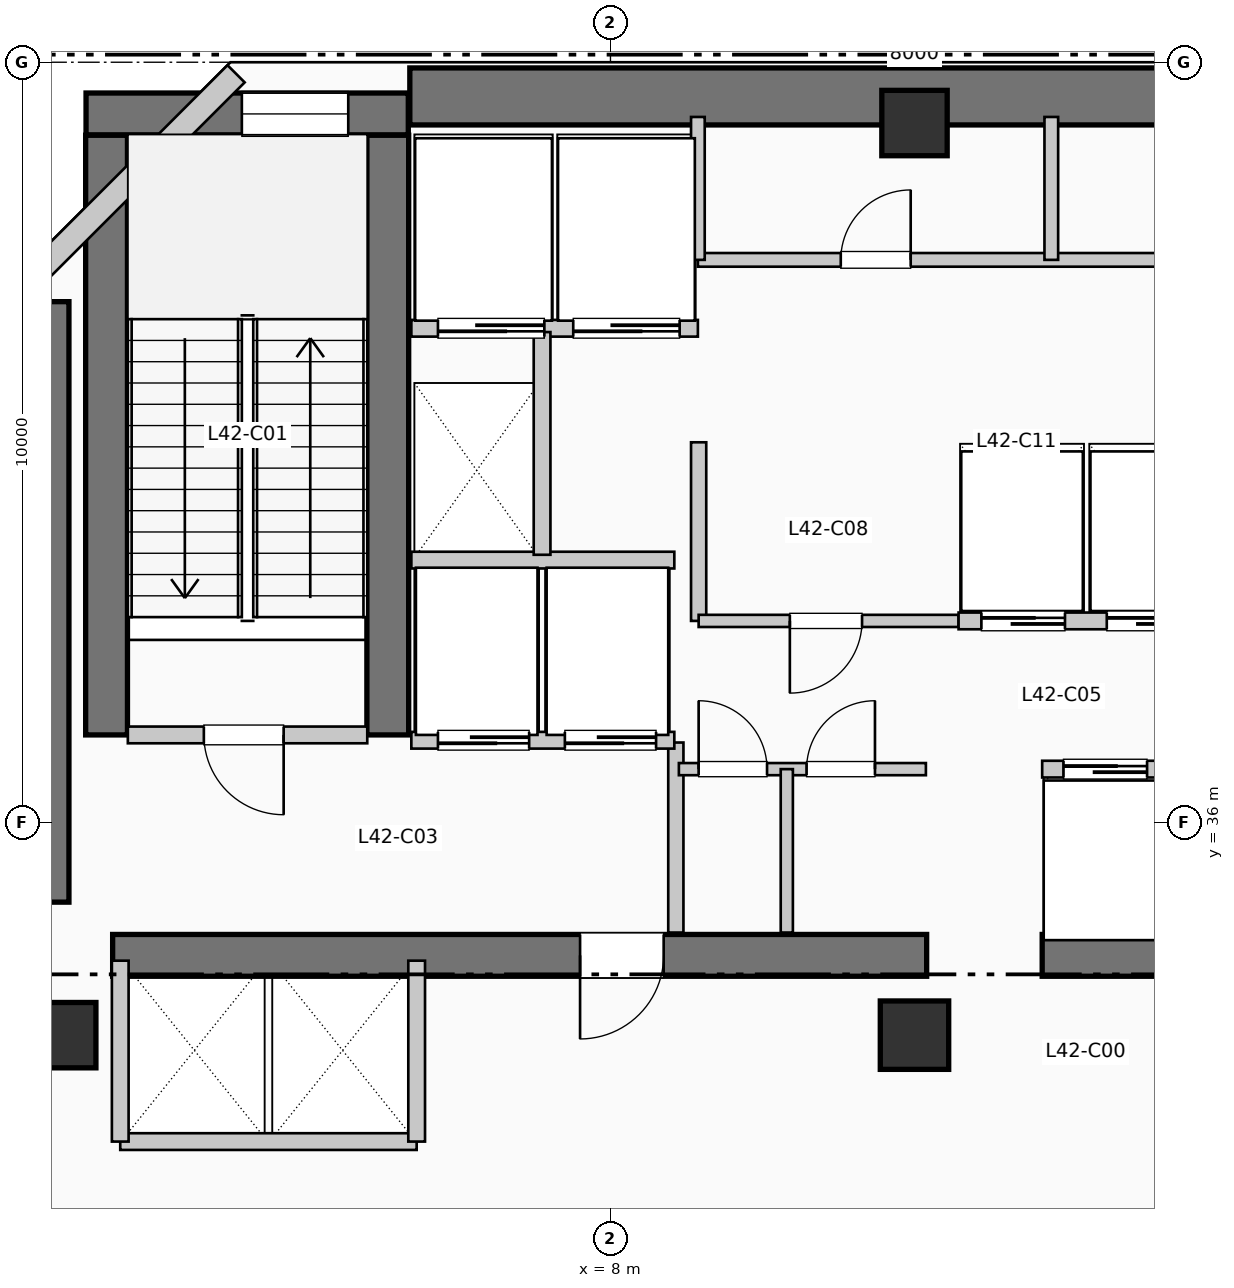
"""IFC4 building model, lengths in metres.
Left out: names, types, materials, properties, quantities, classifications, styles, units other than length and angle.
Written with IfcOpenShell. Run it as: python <this file> out.ifc"""

import sys

from ifc_helpers import new_model, si_unit, direction, frame, frame_2d, origin, origin_2d, place, context, subcontext, project, spatial, rectangle, extrude, element, fill, save


model = new_model("IFC4")
c1 = context("Model", 3, precision=1e-05, world=origin(), true_north=direction((0.0, 1.0)))
c2 = subcontext(c1, "Body", "Model", "MODEL_VIEW")
j1 = project(units=[si_unit("LENGTHUNIT", "METRE"), si_unit("PLANEANGLEUNIT", "RADIAN")], contexts=[c1])
p1 = place(None, origin())
s1 = spatial("IfcSite", under=j1, at=p1, CompositionType="ELEMENT")
p2 = place(p1, origin())
s2 = spatial("IfcBuilding", under=s1, at=p2, CompositionType="ELEMENT")
p3 = place(p2, frame((0.0, 0.0, 174.57)))
s3 = spatial("IfcBuildingStorey", under=s2, at=p3, CompositionType="ELEMENT", Elevation=174.57)
p4 = place(p3, frame((5.36, 45.55, 0.0), z_axis=(0.0, 0.0, 1.0), x_axis=(1.0, 0.0, 0.0)))
e1 = element("IfcWall", 1, at=p4, inside=s3, PredefinedType="SHEAR", context=c2, shape_type="SweptSolid", body=[
    extrude(rectangle(XDim=13.98, YDim=0.75, at=frame_2d((6.99, 0.0))), origin(), (0.0, 0.0, 1.0), 4.95),
])
p5 = place(p3, frame((0.5, 34.95, 0.0), z_axis=(0.0, 0.0, 1.0), x_axis=(0.0, 1.0, 0.0)))
e2 = element("IfcWall", 2, at=p5, inside=s3, PredefinedType="SHEAR", context=c2, shape_type="SweptSolid", body=[
    extrude(rectangle(XDim=7.9, YDim=0.75, at=frame_2d((3.95, 0.0))), origin(), (0.0, 0.0, 1.0), 4.95),
])
p6 = place(p3, frame((1.45, 34.25, 0.0), z_axis=(0.0, 0.0, 1.0), x_axis=(1.0, 0.0, 0.0)))
e3 = element("IfcWall", 3, at=p6, inside=s3, PredefinedType="SHEAR", context=c2, shape_type="SweptSolid", body=[
    extrude(rectangle(XDim=10.71, YDim=0.55, at=frame_2d((5.355, 0.0))), origin(), (0.0, 0.0, 1.0), 4.95),
])
p7 = place(p6, frame((7.25, 0.0, 0.0), z_axis=(0.0, 0.0, 1.0), x_axis=(-1.0, 0.0, 0.0)))
e4 = element("IfcOpeningElement", 4, at=p7, cuts=e3, PredefinedType="OPENING", context=c2, shape_type="SweptSolid", body=[
    extrude(rectangle(XDim=1.1, YDim=2.15, at=frame_2d((0.55, 1.075))), frame((0.0, 0.285, 0.0), z_axis=(0.0, -1.0, 0.0), x_axis=(1.0, 0.0, 0.0)), (0.0, 0.0, 1.0), 0.57),
])
p8 = place(p3, frame((13.68, 34.25, 0.0), z_axis=(0.0, 0.0, 1.0), x_axis=(1.0, 0.0, 0.0)))
e5 = element("IfcWall", 5, at=p8, inside=s3, PredefinedType="SHEAR", context=c2, shape_type="SweptSolid", body=[
    extrude(rectangle(XDim=6.12, YDim=0.55, at=frame_2d((3.06, 0.0))), origin(), (0.0, 0.0, 1.0), 4.95),
])
for number, where, z_axis, x_axis in (
    (6, (1.37, 37.15, 0.0), (0.0, 0.0, 1.0), (0.0, 1.0, 0.0)),
    (7, (5.07, 37.15, 0.0), (0.0, 0.0, 1.0), (0.0, 1.0, 0.0)),
):
    element("IfcWall", number, at=place(p3, frame(where, z_axis=z_axis, x_axis=x_axis)), inside=s3, PredefinedType="SHEAR", context=c2, shape_type="SweptSolid", body=[
        extrude(rectangle(XDim=7.89, YDim=0.55, at=frame_2d((3.945, 0.0))), origin(), (0.0, 0.0, 1.0), 4.95),
    ])
p9 = place(p3, frame((1.1, 45.32, 0.0), z_axis=(0.0, 0.0, 1.0), x_axis=(1.0, 0.0, 0.0)))
e8 = element("IfcWall", 8, at=p9, inside=s3, PredefinedType="SHEAR", context=c2, shape_type="SweptSolid", body=[
    extrude(rectangle(XDim=4.24, YDim=0.55, at=frame_2d((2.12, 0.0))), origin(), (0.0, 0.0, 1.0), 4.95),
])
p10 = place(p9, frame((2.05, 0.0, 1.05)))
e9 = element("IfcOpeningElement", 9, at=p10, cuts=e8, PredefinedType="OPENING", context=c2, shape_type="SweptSolid", body=[
    extrude(rectangle(XDim=1.4, YDim=1.8, at=frame_2d((0.7, 0.9))), frame((0.0, 0.285, 0.0), z_axis=(0.0, -1.0, 0.0), x_axis=(1.0, 0.0, 0.0)), (0.0, 0.0, 1.0), 0.57),
])
p11 = place(p3, frame((0.8, 33.2, 0.0), z_axis=(0.0, 0.0, 1.0), x_axis=(1.0, 0.0, 0.0)))
e10 = element("IfcColumn", 10, at=p11, inside=s3, PredefinedType="COLUMN", context=c2, shape_type="SweptSolid", body=[
    extrude(rectangle(XDim=0.86, YDim=0.86, at=origin_2d()), origin(), (0.0, 0.0, 1.0), 4.95),
])
p12 = place(p3, frame((12.0, 33.2, 0.0), z_axis=(0.0, 0.0, 1.0), x_axis=(1.0, 0.0, 0.0)))
e11 = element("IfcColumn", 11, at=p12, inside=s3, PredefinedType="COLUMN", context=c2, shape_type="SweptSolid", body=[
    extrude(rectangle(XDim=0.9, YDim=0.9, at=origin_2d()), origin(), (0.0, 0.0, 1.0), 4.95),
])
p13 = place(p3, frame((12.0, 45.2, 0.0), z_axis=(0.0, 0.0, 1.0), x_axis=(1.0, 0.0, 0.0)))
e12 = element("IfcColumn", 12, at=p13, inside=s3, PredefinedType="COLUMN", context=c2, shape_type="SweptSolid", body=[
    extrude(rectangle(XDim=0.86, YDim=0.86, at=origin_2d()), origin(), (0.0, 0.0, 1.0), 4.95),
])
p14 = place(p3, frame((3.074, 45.848, 0.0), z_axis=(0.0, 0.0, 1.0), x_axis=(-0.707106781187, -0.707106781187, 0.0)))
e13 = element("IfcWall", 13, at=p14, inside=s3, PredefinedType="SOLIDWALL", context=c2, shape_type="SweptSolid", body=[
    extrude(rectangle(XDim=4.133, YDim=0.32, at=frame_2d((2.066, 0.0))), origin(), (0.0, 0.0, 1.0), 4.7),
])
p15 = place(p3, frame((1.65, 37.15, 0.0), z_axis=(0.0, 0.0, 1.0), x_axis=(1.0, 0.0, 0.0)))
e14 = element("IfcWall", 14, at=p15, inside=s3, PredefinedType="PARTITIONING", context=c2, shape_type="SweptSolid", body=[
    extrude(rectangle(XDim=3.15, YDim=0.22, at=frame_2d((1.575, 0.0))), origin(), (0.0, 0.0, 1.0), 4.7),
])
p16 = place(p15, frame((2.05, 0.0, 0.0), z_axis=(0.0, 0.0, 1.0), x_axis=(-1.0, 0.0, 0.0)))
e15 = element("IfcOpeningElement", 15, at=p16, cuts=e14, PredefinedType="OPENING", context=c2, shape_type="SweptSolid", body=[
    extrude(rectangle(XDim=1.05, YDim=2.15, at=frame_2d((0.525, 1.075))), frame((0.0, 0.12, 0.0), z_axis=(0.0, -1.0, 0.0), x_axis=(1.0, 0.0, 0.0)), (0.0, 0.0, 1.0), 0.24),
])
p17 = place(p3, frame((8.86, 34.55, 0.0), z_axis=(0.0, 0.0, 1.0), x_axis=(0.0, 1.0, 0.0)))
e16 = element("IfcWall", 16, at=p17, inside=s3, PredefinedType="PARTITIONING", context=c2, shape_type="SweptSolid", body=[
    extrude(rectangle(XDim=2.5, YDim=0.2, at=frame_2d((1.25, 0.0))), origin(), (0.0, 0.0, 1.0), 4.7),
])
p18 = place(p3, frame((5.38, 37.08, 0.0), z_axis=(0.0, 0.0, 1.0), x_axis=(1.0, 0.0, 0.0)))
e17 = element("IfcWall", 17, at=p18, inside=s3, PredefinedType="PARTITIONING", context=c2, shape_type="SweptSolid", body=[
    extrude(rectangle(XDim=3.46, YDim=0.22, at=frame_2d((1.73, 0.0))), origin(), (0.0, 0.0, 1.0), 4.7),
])
p19 = place(p18, frame((1.55, 0.0, 0.0), z_axis=(0.0, 0.0, 1.0), x_axis=(-1.0, 0.0, 0.0)))
e18 = element("IfcOpeningElement", 18, at=p19, cuts=e17, PredefinedType="OPENING", context=c2, shape_type="SweptSolid", body=[
    extrude(rectangle(XDim=1.2, YDim=2.2, at=frame_2d((0.6, 1.1))), frame((0.0, 0.12, 0.0), z_axis=(0.0, -1.0, 0.0), x_axis=(1.0, 0.0, 0.0)), (0.0, 0.0, 1.0), 0.24),
])
p20 = place(p18, frame((3.22, 0.0, 0.0), z_axis=(0.0, 0.0, 1.0), x_axis=(-1.0, 0.0, 0.0)))
e19 = element("IfcOpeningElement", 19, at=p20, cuts=e17, PredefinedType="OPENING", context=c2, shape_type="SweptSolid", body=[
    extrude(rectangle(XDim=1.2, YDim=2.2, at=frame_2d((0.6, 1.1))), frame((0.0, 0.12, 0.0), z_axis=(0.0, -1.0, 0.0), x_axis=(1.0, 0.0, 0.0)), (0.0, 0.0, 1.0), 0.24),
])
p21 = place(p3, frame((5.38, 39.45, 0.0), z_axis=(0.0, 0.0, 1.0), x_axis=(1.0, 0.0, 0.0)))
e20 = element("IfcWall", 20, at=p21, inside=s3, PredefinedType="PARTITIONING", context=c2, shape_type="SweptSolid", body=[
    extrude(rectangle(XDim=3.46, YDim=0.22, at=frame_2d((1.73, 0.0))), origin(), (0.0, 0.0, 1.0), 4.7),
])
p22 = place(p3, frame((5.38, 42.5, 0.0), z_axis=(0.0, 0.0, 1.0), x_axis=(1.0, 0.0, 0.0)))
e21 = element("IfcWall", 21, at=p22, inside=s3, PredefinedType="PARTITIONING", context=c2, shape_type="SweptSolid", body=[
    extrude(rectangle(XDim=3.77, YDim=0.22, at=frame_2d((1.885, 0.0))), origin(), (0.0, 0.0, 1.0), 4.7),
])
p23 = place(p22, frame((1.75, 0.0, 0.0), z_axis=(0.0, 0.0, 1.0), x_axis=(-1.0, 0.0, 0.0)))
e22 = element("IfcOpeningElement", 22, at=p23, cuts=e21, PredefinedType="OPENING", context=c2, shape_type="SweptSolid", body=[
    extrude(rectangle(XDim=1.4, YDim=2.2, at=frame_2d((0.7, 1.1))), frame((0.0, 0.12, 0.0), z_axis=(0.0, -1.0, 0.0), x_axis=(1.0, 0.0, 0.0)), (0.0, 0.0, 1.0), 0.24),
])
p24 = place(p22, frame((3.53, 0.0, 0.0), z_axis=(0.0, 0.0, 1.0), x_axis=(-1.0, 0.0, 0.0)))
e23 = element("IfcOpeningElement", 23, at=p24, cuts=e21, PredefinedType="OPENING", context=c2, shape_type="SweptSolid", body=[
    extrude(rectangle(XDim=1.4, YDim=2.2, at=frame_2d((0.7, 1.1))), frame((0.0, 0.12, 0.0), z_axis=(0.0, -1.0, 0.0), x_axis=(1.0, 0.0, 0.0)), (0.0, 0.0, 1.0), 0.24),
])
p25 = place(p3, frame((7.1, 39.52, 0.0), z_axis=(0.0, 0.0, 1.0), x_axis=(0.0, 1.0, 0.0)))
e24 = element("IfcWall", 24, at=p25, inside=s3, PredefinedType="PARTITIONING", context=c2, shape_type="SweptSolid", body=[
    extrude(rectangle(XDim=2.93, YDim=0.22, at=frame_2d((1.465, 0.0))), origin(), (0.0, 0.0, 1.0), 4.7),
])
p26 = place(p3, frame((1.55, 31.8, 0.0), z_axis=(0.0, 0.0, 1.0), x_axis=(1.0, 0.0, 0.0)))
e25 = element("IfcWall", 25, at=p26, inside=s3, PredefinedType="PARTITIONING", context=c2, shape_type="SweptSolid", body=[
    extrude(rectangle(XDim=3.9, YDim=0.22, at=frame_2d((1.95, 0.0))), origin(), (0.0, 0.0, 1.0), 4.7),
])
for number, where, z_axis, x_axis in (
    (26, (1.55, 31.8, 0.0), (0.0, 0.0, 1.0), (0.0, 1.0, 0.0)),
    (27, (5.45, 31.8, 0.0), (0.0, 0.0, 1.0), (0.0, 1.0, 0.0)),
):
    element("IfcWall", number, at=place(p3, frame(where, z_axis=z_axis, x_axis=x_axis)), inside=s3, PredefinedType="PARTITIONING", context=c2, shape_type="SweptSolid", body=[
        extrude(rectangle(XDim=2.38, YDim=0.22, at=frame_2d((1.19, 0.0))), origin(), (0.0, 0.0, 1.0), 4.7),
    ])
p27 = place(p3, frame((9.16, 38.65, 0.0), z_axis=(0.0, 0.0, 1.0), x_axis=(0.0, 1.0, 0.0)))
e28 = element("IfcWall", 28, at=p27, inside=s3, PredefinedType="PARTITIONING", context=c2, shape_type="SweptSolid", body=[
    extrude(rectangle(XDim=2.35, YDim=0.2, at=frame_2d((1.175, 0.0))), origin(), (0.0, 0.0, 1.0), 4.7),
])
p28 = place(p3, frame((8.9, 36.7, 0.0), z_axis=(0.0, 0.0, 1.0), x_axis=(1.0, 0.0, 0.0)))
e29 = element("IfcWall", 29, at=p28, inside=s3, PredefinedType="PARTITIONING", context=c2, shape_type="SweptSolid", body=[
    extrude(rectangle(XDim=3.25, YDim=0.16, at=frame_2d((1.625, 0.0))), origin(), (0.0, 0.0, 1.0), 4.7),
])
p29 = place(p28, frame((0.26, 0.0, 0.0)))
e30 = element("IfcOpeningElement", 30, at=p29, cuts=e29, PredefinedType="OPENING", context=c2, shape_type="SweptSolid", body=[
    extrude(rectangle(XDim=0.9, YDim=2.15, at=frame_2d((0.45, 1.075))), frame((0.0, 0.09, 0.0), z_axis=(0.0, -1.0, 0.0), x_axis=(1.0, 0.0, 0.0)), (0.0, 0.0, 1.0), 0.18),
])
p30 = place(p28, frame((1.68, 0.0, 0.0)))
e31 = element("IfcOpeningElement", 31, at=p30, cuts=e29, PredefinedType="OPENING", context=c2, shape_type="SweptSolid", body=[
    extrude(rectangle(XDim=0.9, YDim=2.15, at=frame_2d((0.45, 1.075))), frame((0.0, 0.09, 0.0), z_axis=(0.0, -1.0, 0.0), x_axis=(1.0, 0.0, 0.0)), (0.0, 0.0, 1.0), 0.18),
])
p31 = place(p3, frame((10.32, 34.55, 0.0), z_axis=(0.0, 0.0, 1.0), x_axis=(0.0, 1.0, 0.0)))
e32 = element("IfcWall", 32, at=p31, inside=s3, PredefinedType="PARTITIONING", context=c2, shape_type="SweptSolid", body=[
    extrude(rectangle(XDim=2.15, YDim=0.16, at=frame_2d((1.075, 0.0))), origin(), (0.0, 0.0, 1.0), 4.7),
])
p32 = place(p3, frame((9.16, 38.65, 0.0), z_axis=(0.0, 0.0, 1.0), x_axis=(1.0, 0.0, 0.0)))
e33 = element("IfcWall", 33, at=p32, inside=s3, PredefinedType="PARTITIONING", context=c2, shape_type="SweptSolid", body=[
    extrude(rectangle(XDim=3.42, YDim=0.16, at=frame_2d((1.71, 0.0))), origin(), (0.0, 0.0, 1.0), 4.7),
])
p33 = place(p32, frame((2.15, 0.0, 0.0), z_axis=(0.0, 0.0, 1.0), x_axis=(-1.0, 0.0, 0.0)))
e34 = element("IfcOpeningElement", 34, at=p33, cuts=e33, PredefinedType="OPENING", context=c2, shape_type="SweptSolid", body=[
    extrude(rectangle(XDim=0.95, YDim=2.15, at=frame_2d((0.475, 1.075))), frame((0.0, 0.09, 0.0), z_axis=(0.0, -1.0, 0.0), x_axis=(1.0, 0.0, 0.0)), (0.0, 0.0, 1.0), 0.18),
])
p34 = place(p3, frame((13.68, 36.7, 0.0), z_axis=(0.0, 0.0, 1.0), x_axis=(1.0, 0.0, 0.0)))
e35 = element("IfcWall", 35, at=p34, inside=s3, PredefinedType="PARTITIONING", context=c2, shape_type="SweptSolid", body=[
    extrude(rectangle(XDim=3.28, YDim=0.22, at=frame_2d((1.64, 0.0))), origin(), (0.0, 0.0, 1.0), 4.7),
])
p35 = place(p34, frame((0.28, 0.0, 0.0)))
e36 = element("IfcOpeningElement", 36, at=p35, cuts=e35, PredefinedType="OPENING", context=c2, shape_type="SweptSolid", body=[
    extrude(rectangle(XDim=1.1, YDim=2.2, at=frame_2d((0.55, 1.1))), frame((0.0, 0.12, 0.0), z_axis=(0.0, -1.0, 0.0), x_axis=(1.0, 0.0, 0.0)), (0.0, 0.0, 1.0), 0.24),
])
p36 = place(p34, frame((1.9, 0.0, 0.0)))
e37 = element("IfcOpeningElement", 37, at=p36, cuts=e35, PredefinedType="OPENING", context=c2, shape_type="SweptSolid", body=[
    extrude(rectangle(XDim=1.1, YDim=2.2, at=frame_2d((0.55, 1.1))), frame((0.0, 0.12, 0.0), z_axis=(0.0, -1.0, 0.0), x_axis=(1.0, 0.0, 0.0)), (0.0, 0.0, 1.0), 0.24),
])
p37 = place(p3, frame((12.58, 38.65, 0.0), z_axis=(0.0, 0.0, 1.0), x_axis=(1.0, 0.0, 0.0)))
e38 = element("IfcWall", 38, at=p37, inside=s3, PredefinedType="PARTITIONING", context=c2, shape_type="SweptSolid", body=[
    extrude(rectangle(XDim=3.38, YDim=0.22, at=frame_2d((1.69, 0.0))), origin(), (0.0, 0.0, 1.0), 4.7),
])
p38 = place(p37, frame((0.3, 0.0, 0.0)))
e39 = element("IfcOpeningElement", 39, at=p38, cuts=e38, PredefinedType="OPENING", context=c2, shape_type="SweptSolid", body=[
    extrude(rectangle(XDim=1.1, YDim=2.2, at=frame_2d((0.55, 1.1))), frame((0.0, 0.12, 0.0), z_axis=(0.0, -1.0, 0.0), x_axis=(1.0, 0.0, 0.0)), (0.0, 0.0, 1.0), 0.24),
])
p39 = place(p37, frame((1.95, 0.0, 0.0)))
e40 = element("IfcOpeningElement", 40, at=p39, cuts=e38, PredefinedType="OPENING", context=c2, shape_type="SweptSolid", body=[
    extrude(rectangle(XDim=1.1, YDim=2.2, at=frame_2d((0.55, 1.1))), frame((0.0, 0.12, 0.0), z_axis=(0.0, -1.0, 0.0), x_axis=(1.0, 0.0, 0.0)), (0.0, 0.0, 1.0), 0.24),
])
p40 = place(p3, frame((9.15, 43.4, 0.0), z_axis=(0.0, 0.0, 1.0), x_axis=(1.0, 0.0, 0.0)))
e41 = element("IfcWall", 41, at=p40, inside=s3, PredefinedType="PLUMBINGWALL", context=c2, shape_type="SweptSolid", body=[
    extrude(rectangle(XDim=9.33, YDim=0.18, at=frame_2d((4.665, 0.0))), origin(), (0.0, 0.0, 1.0), 4.7),
])
p41 = place(p40, frame((1.88, 0.0, 0.0)))
e42 = element("IfcOpeningElement", 42, at=p41, cuts=e41, PredefinedType="OPENING", context=c2, shape_type="SweptSolid", body=[
    extrude(rectangle(XDim=0.92, YDim=2.1, at=frame_2d((0.46, 1.05))), frame((0.0, 0.1, 0.0), z_axis=(0.0, -1.0, 0.0), x_axis=(1.0, 0.0, 0.0)), (0.0, 0.0, 1.0), 0.2),
])
p42 = place(p40, frame((6.515, 0.0, 0.0)))
e43 = element("IfcOpeningElement", 43, at=p42, cuts=e41, PredefinedType="OPENING", context=c2, shape_type="SweptSolid", body=[
    extrude(rectangle(XDim=0.92, YDim=2.1, at=frame_2d((0.46, 1.05))), frame((0.0, 0.1, 0.0), z_axis=(0.0, -1.0, 0.0), x_axis=(1.0, 0.0, 0.0)), (0.0, 0.0, 1.0), 0.2),
])
for number, where, z_axis, x_axis in (
    (44, (9.15, 43.4, 0.0), (0.0, 0.0, 1.0), (0.0, 1.0, 0.0)),
    (45, (13.8, 43.4, 0.0), (0.0, 0.0, 1.0), (0.0, 1.0, 0.0)),
):
    element("IfcWall", number, at=place(p3, frame(where, z_axis=z_axis, x_axis=x_axis)), inside=s3, PredefinedType="PLUMBINGWALL", context=c2, shape_type="SweptSolid", body=[
        extrude(rectangle(XDim=1.88, YDim=0.18, at=frame_2d((0.94, 0.0))), origin(), (0.0, 0.0, 1.0), 4.7),
    ])
p43 = place(p10, origin())
e46 = element("IfcWindow", 46, at=p43, inside=s3, PartitioningType="SINGLE_PANEL", PredefinedType="WINDOW", context=c2, shape_type="SweptSolid", body=[
    extrude(rectangle(XDim=1.4, YDim=1.8, at=frame_2d((0.7, 0.9))), frame((0.0, 0.03, 0.0), z_axis=(0.0, -1.0, 0.0), x_axis=(1.0, 0.0, 0.0)), (0.0, 0.0, 1.0), 0.06),
])
fill(e9, e46)
p44 = place(p16, origin())
e47 = element("IfcDoor", 47, at=p44, inside=s3, OperationType="SINGLE_SWING_RIGHT", PredefinedType="DOOR", context=c2, shape_type="SweptSolid", body=[
    extrude(rectangle(XDim=1.05, YDim=2.15, at=frame_2d((0.525, 1.075))), frame((0.0, 0.025, 0.0), z_axis=(0.0, -1.0, 0.0), x_axis=(1.0, 0.0, 0.0)), (0.0, 0.0, 1.0), 0.05),
])
fill(e15, e47)
p45 = place(p7, origin())
e48 = element("IfcDoor", 48, at=p45, inside=s3, OperationType="SINGLE_SWING_LEFT", PredefinedType="DOOR", context=c2, shape_type="SweptSolid", body=[
    extrude(rectangle(XDim=1.1, YDim=2.15, at=frame_2d((0.55, 1.075))), frame((0.0, 0.025, 0.0), z_axis=(0.0, -1.0, 0.0), x_axis=(1.0, 0.0, 0.0)), (0.0, 0.0, 1.0), 0.05),
])
fill(e4, e48)
p46 = place(p19, origin())
e49 = element("IfcDoor", 49, at=p46, inside=s3, OperationType="SLIDING_TO_RIGHT", PredefinedType="DOOR", context=c2, shape_type="SweptSolid", body=[
    extrude(rectangle(XDim=1.2, YDim=2.2, at=frame_2d((0.6, 1.1))), frame((0.0, 0.025, 0.0), z_axis=(0.0, -1.0, 0.0), x_axis=(1.0, 0.0, 0.0)), (0.0, 0.0, 1.0), 0.05),
])
fill(e18, e49)
p47 = place(p20, origin())
e50 = element("IfcDoor", 50, at=p47, inside=s3, OperationType="SLIDING_TO_RIGHT", PredefinedType="DOOR", context=c2, shape_type="SweptSolid", body=[
    extrude(rectangle(XDim=1.2, YDim=2.2, at=frame_2d((0.6, 1.1))), frame((0.0, 0.025, 0.0), z_axis=(0.0, -1.0, 0.0), x_axis=(1.0, 0.0, 0.0)), (0.0, 0.0, 1.0), 0.05),
])
fill(e19, e50)
p48 = place(p23, origin())
e51 = element("IfcDoor", 51, at=p48, inside=s3, OperationType="SLIDING_TO_LEFT", PredefinedType="DOOR", context=c2, shape_type="SweptSolid", body=[
    extrude(rectangle(XDim=1.4, YDim=2.2, at=frame_2d((0.7, 1.1))), frame((0.0, 0.025, 0.0), z_axis=(0.0, -1.0, 0.0), x_axis=(1.0, 0.0, 0.0)), (0.0, 0.0, 1.0), 0.05),
])
fill(e22, e51)
p49 = place(p24, origin())
e52 = element("IfcDoor", 52, at=p49, inside=s3, OperationType="SLIDING_TO_LEFT", PredefinedType="DOOR", context=c2, shape_type="SweptSolid", body=[
    extrude(rectangle(XDim=1.4, YDim=2.2, at=frame_2d((0.7, 1.1))), frame((0.0, 0.025, 0.0), z_axis=(0.0, -1.0, 0.0), x_axis=(1.0, 0.0, 0.0)), (0.0, 0.0, 1.0), 0.05),
])
fill(e23, e52)
p50 = place(p29, origin())
e53 = element("IfcDoor", 53, at=p50, inside=s3, OperationType="SINGLE_SWING_LEFT", PredefinedType="DOOR", context=c2, shape_type="SweptSolid", body=[
    extrude(rectangle(XDim=0.9, YDim=2.15, at=frame_2d((0.45, 1.075))), frame((0.0, 0.025, 0.0), z_axis=(0.0, -1.0, 0.0), x_axis=(1.0, 0.0, 0.0)), (0.0, 0.0, 1.0), 0.05),
])
fill(e30, e53)
p51 = place(p30, origin())
e54 = element("IfcDoor", 54, at=p51, inside=s3, OperationType="SINGLE_SWING_RIGHT", PredefinedType="DOOR", context=c2, shape_type="SweptSolid", body=[
    extrude(rectangle(XDim=0.9, YDim=2.15, at=frame_2d((0.45, 1.075))), frame((0.0, 0.025, 0.0), z_axis=(0.0, -1.0, 0.0), x_axis=(1.0, 0.0, 0.0)), (0.0, 0.0, 1.0), 0.05),
])
fill(e31, e54)
p52 = place(p33, origin())
e55 = element("IfcDoor", 55, at=p52, inside=s3, OperationType="SINGLE_SWING_LEFT", PredefinedType="DOOR", context=c2, shape_type="SweptSolid", body=[
    extrude(rectangle(XDim=0.95, YDim=2.15, at=frame_2d((0.475, 1.075))), frame((0.0, 0.025, 0.0), z_axis=(0.0, -1.0, 0.0), x_axis=(1.0, 0.0, 0.0)), (0.0, 0.0, 1.0), 0.05),
])
fill(e34, e55)
p53 = place(p35, origin())
e56 = element("IfcDoor", 56, at=p53, inside=s3, OperationType="SLIDING_TO_RIGHT", PredefinedType="DOOR", context=c2, shape_type="SweptSolid", body=[
    extrude(rectangle(XDim=1.1, YDim=2.2, at=frame_2d((0.55, 1.1))), frame((0.0, 0.025, 0.0), z_axis=(0.0, -1.0, 0.0), x_axis=(1.0, 0.0, 0.0)), (0.0, 0.0, 1.0), 0.05),
])
fill(e36, e56)
p54 = place(p38, origin())
e57 = element("IfcDoor", 57, at=p54, inside=s3, OperationType="SLIDING_TO_RIGHT", PredefinedType="DOOR", context=c2, shape_type="SweptSolid", body=[
    extrude(rectangle(XDim=1.1, YDim=2.2, at=frame_2d((0.55, 1.1))), frame((0.0, 0.025, 0.0), z_axis=(0.0, -1.0, 0.0), x_axis=(1.0, 0.0, 0.0)), (0.0, 0.0, 1.0), 0.05),
])
fill(e39, e57)
p55 = place(p39, origin())
e58 = element("IfcDoor", 58, at=p55, inside=s3, OperationType="SLIDING_TO_RIGHT", PredefinedType="DOOR", context=c2, shape_type="SweptSolid", body=[
    extrude(rectangle(XDim=1.1, YDim=2.2, at=frame_2d((0.55, 1.1))), frame((0.0, 0.025, 0.0), z_axis=(0.0, -1.0, 0.0), x_axis=(1.0, 0.0, 0.0)), (0.0, 0.0, 1.0), 0.05),
])
fill(e40, e58)
p56 = place(p41, origin())
e59 = element("IfcDoor", 59, at=p56, inside=s3, OperationType="SINGLE_SWING_RIGHT", PredefinedType="DOOR", context=c2, shape_type="SweptSolid", body=[
    extrude(rectangle(XDim=0.92, YDim=2.1, at=frame_2d((0.46, 1.05))), frame((0.0, 0.025, 0.0), z_axis=(0.0, -1.0, 0.0), x_axis=(1.0, 0.0, 0.0)), (0.0, 0.0, 1.0), 0.05),
])
fill(e42, e59)
save(model, sys.argv[1])
